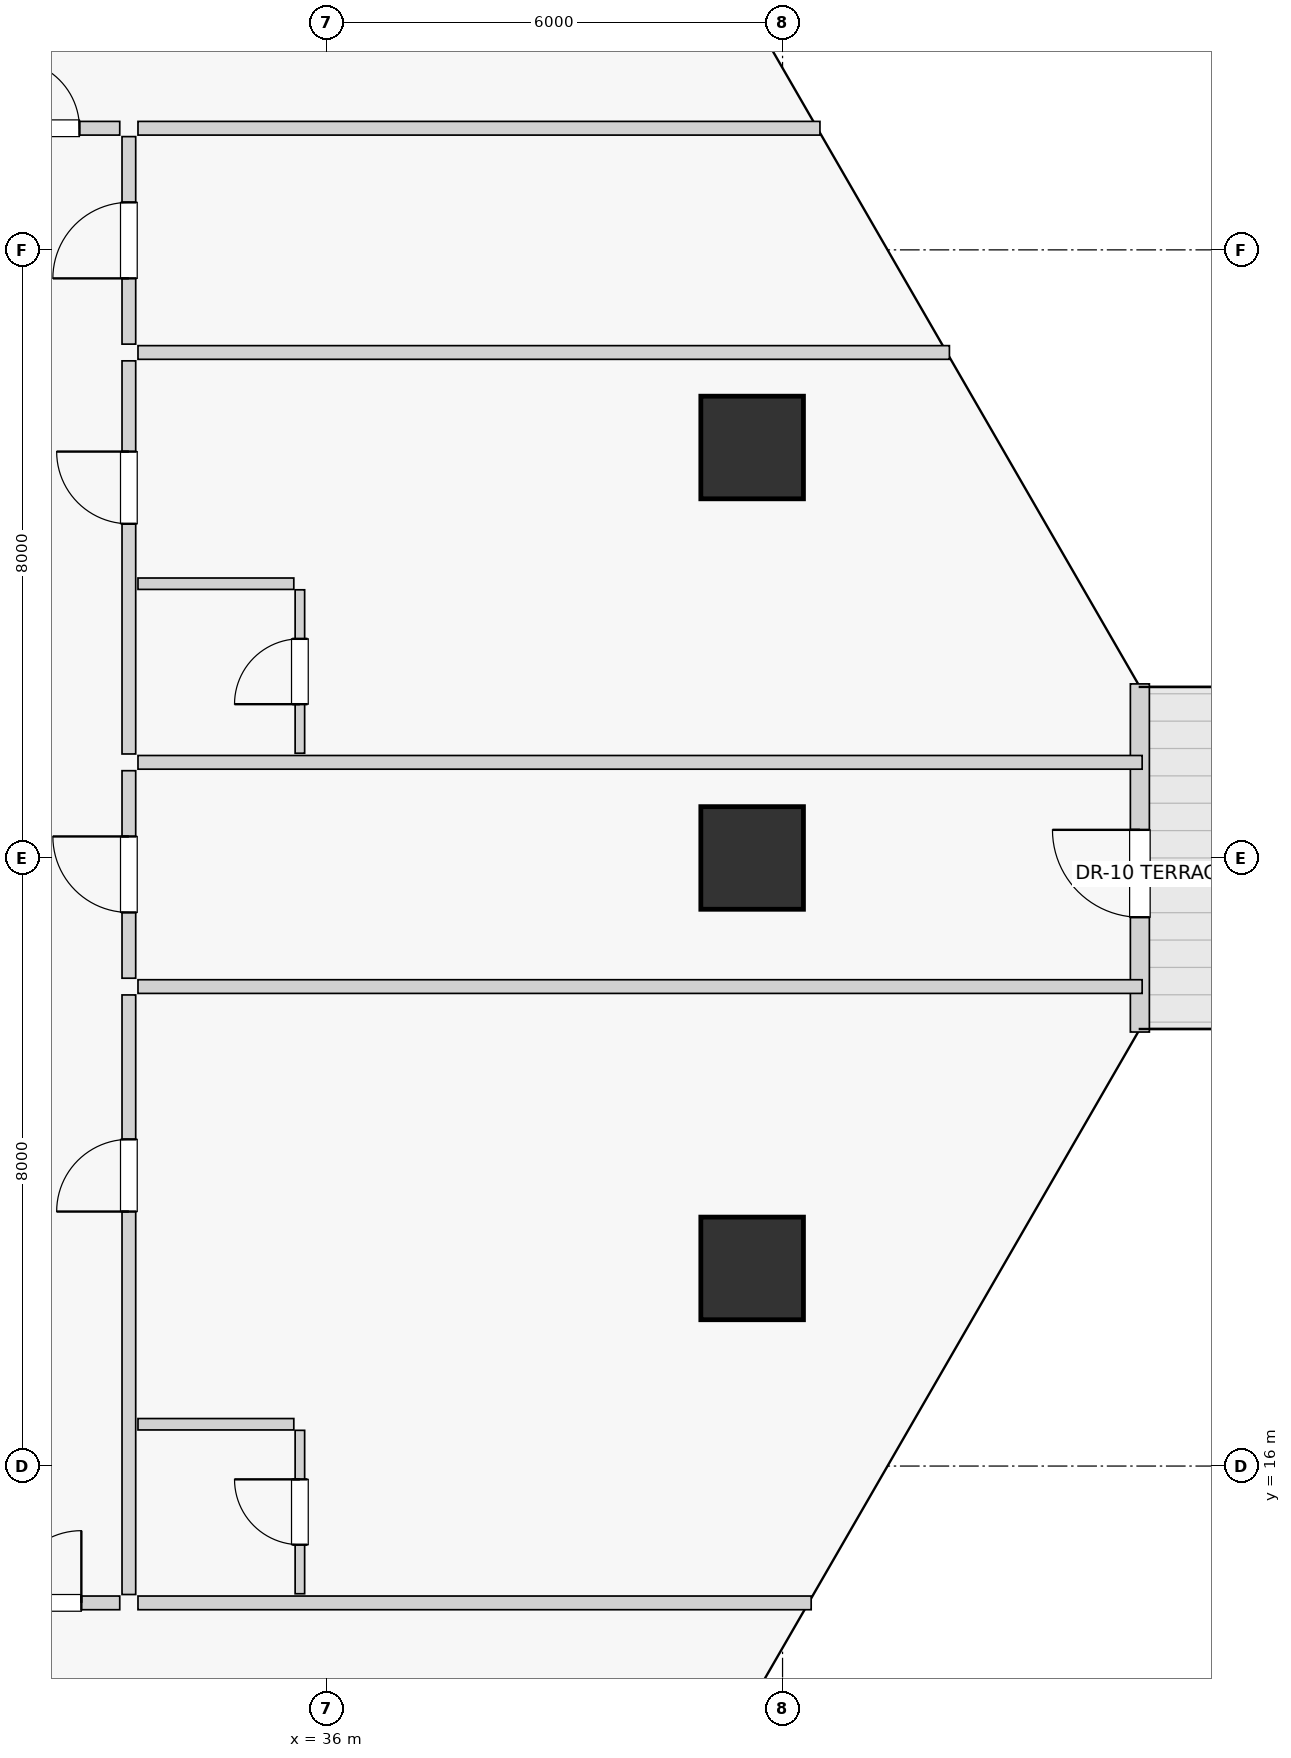
"""IFC4 building model, lengths in metres.
Left out: names, types, materials, properties, quantities, classifications, styles, units other than length and angle.
Written with IfcOpenShell. Run it as: python <this file> out.ifc"""

import sys

from ifc_helpers import new_model, si_unit, direction, frame, frame_2d, origin, origin_2d, place, context, subcontext, project, spatial, rectangle, extrude, source, transform, mapped, element, fill, save


model = new_model("IFC4")
c1 = context("Model", 3, precision=1e-05, world=origin(), true_north=direction((0.0, 1.0)))
c2 = subcontext(c1, "Body", "Model", "MODEL_VIEW")
j1 = project(units=[si_unit("LENGTHUNIT", "METRE"), si_unit("PLANEANGLEUNIT", "RADIAN")], contexts=[c1])
p1 = place(None, origin())
s1 = spatial("IfcSite", under=j1, at=p1, CompositionType="ELEMENT")
p2 = place(p1, origin())
s2 = spatial("IfcBuilding", under=s1, at=p2, CompositionType="ELEMENT")
p3 = place(p2, frame((0.0, 0.0, 22.8)))
s3 = spatial("IfcBuildingStorey", under=s2, at=p3, CompositionType="ELEMENT", Elevation=22.8)
p4 = place(p3, frame((41.6, 18.6, 0.0), z_axis=(0.0, 0.0, 1.0), x_axis=(1.0, 0.0, 0.0)))
e1 = element("IfcColumn", 1, at=p4, inside=s3, PredefinedType="COLUMN", context=c2, shape_type="SweptSolid", body=[
    extrude(rectangle(XDim=1.35, YDim=1.35, at=origin_2d()), origin(), (0.0, 0.0, 1.0), 4.5),
])
p5 = place(p3, frame((41.6, 24.0, -0.35), z_axis=(0.0, 0.0, 1.0), x_axis=(1.0, 0.0, 0.0)))
e2 = element("IfcColumn", 2, at=p5, inside=s3, PredefinedType="COLUMN", context=c2, shape_type="SweptSolid", body=[
    extrude(rectangle(XDim=1.35, YDim=1.35, at=origin_2d()), origin(), (0.0, 0.0, 1.0), 4.85),
])
p6 = place(p3, frame((41.6, 29.4, 0.0), z_axis=(0.0, 0.0, 1.0), x_axis=(1.0, 0.0, 0.0)))
e3 = element("IfcColumn", 3, at=p6, inside=s3, PredefinedType="COLUMN", context=c2, shape_type="SweptSolid", body=[
    extrude(rectangle(XDim=1.35, YDim=1.35, at=origin_2d()), origin(), (0.0, 0.0, 1.0), 4.5),
])
p7 = place(p3, frame((46.701, 21.71, 0.0), z_axis=(0.0, 0.0, 1.0), x_axis=(0.0, 1.0, 0.0)))
e4 = element("IfcWall", 4, at=p7, inside=s3, PredefinedType="SOLIDWALL", context=c2, shape_type="SweptSolid", body=[
    extrude(rectangle(XDim=4.58, YDim=0.25, at=frame_2d((2.29, 0.0))), origin(), (0.0, 0.0, 1.0), 4.25),
])
p8 = place(p7, frame((1.51, 0.0, 0.0)))
e5 = element("IfcOpeningElement", 5, at=p8, cuts=e4, PredefinedType="OPENING", context=c2, shape_type="SweptSolid", body=[
    extrude(rectangle(XDim=1.15, YDim=2.25, at=frame_2d((0.575, 1.125))), frame((0.0, 0.135, 0.0), z_axis=(0.0, -1.0, 0.0), x_axis=(1.0, 0.0, 0.0)), (0.0, 0.0, 1.0), 0.27),
])
p9 = place(p3, frame((33.52, 14.2, 0.0), z_axis=(0.0, 0.0, 1.0), x_axis=(1.0, 0.0, 0.0)))
e6 = element("IfcWall", 6, at=p9, inside=s3, PredefinedType="PARTITIONING", context=c2, shape_type="SweptSolid", body=[
    extrude(rectangle(XDim=8.857, YDim=0.18, at=frame_2d((4.428, 0.0))), origin(), (0.0, 0.0, 1.0), 4.25),
])
p10 = place(p3, frame((33.52, 33.6, 0.0), z_axis=(0.0, 0.0, 1.0), x_axis=(1.0, 0.0, 0.0)))
e7 = element("IfcWall", 7, at=p10, inside=s3, PredefinedType="PARTITIONING", context=c2, shape_type="SweptSolid", body=[
    extrude(rectangle(XDim=8.972, YDim=0.18, at=frame_2d((4.486, 0.0))), origin(), (0.0, 0.0, 1.0), 4.25),
])
p11 = place(p3, frame((33.4, 22.418, 0.0), z_axis=(0.0, 0.0, 1.0), x_axis=(0.0, 1.0, 0.0)))
e8 = element("IfcWall", 8, at=p11, inside=s3, PredefinedType="PARTITIONING", context=c2, shape_type="SweptSolid", body=[
    extrude(rectangle(XDim=2.73, YDim=0.18, at=frame_2d((1.365, 0.0))), origin(), (0.0, 0.0, 1.0), 4.25),
])
p12 = place(p11, frame((0.865, 0.0, 0.0)))
e9 = element("IfcOpeningElement", 9, at=p12, cuts=e8, PredefinedType="OPENING", context=c2, shape_type="SweptSolid", body=[
    extrude(rectangle(XDim=1.0, YDim=2.01, at=frame_2d((0.5, 1.005))), frame((0.0, 0.1, 0.0), z_axis=(0.0, -1.0, 0.0), x_axis=(1.0, 0.0, 0.0)), (0.0, 0.0, 1.0), 0.2),
])
p13 = place(p3, frame((33.52, 22.308, 0.0), z_axis=(0.0, 0.0, 1.0), x_axis=(1.0, 0.0, 0.0)))
e10 = element("IfcWall", 10, at=p13, inside=s3, PredefinedType="PARTITIONING", context=c2, shape_type="SweptSolid", body=[
    extrude(rectangle(XDim=13.211, YDim=0.18, at=frame_2d((6.605, 0.0))), origin(), (0.0, 0.0, 1.0), 4.25),
])
p14 = place(p3, frame((33.4, 14.31, 0.0), z_axis=(0.0, 0.0, 1.0), x_axis=(0.0, 1.0, 0.0)))
e11 = element("IfcWall", 11, at=p14, inside=s3, PredefinedType="PARTITIONING", context=c2, shape_type="SweptSolid", body=[
    extrude(rectangle(XDim=7.888, YDim=0.18, at=frame_2d((3.944, 0.0))), origin(), (0.0, 0.0, 1.0), 4.25),
])
p15 = place(p14, frame((5.038, 0.0, 0.0)))
e12 = element("IfcOpeningElement", 12, at=p15, cuts=e11, PredefinedType="OPENING", context=c2, shape_type="SweptSolid", body=[
    extrude(rectangle(XDim=0.95, YDim=2.02, at=frame_2d((0.475, 1.01))), frame((0.0, 0.1, 0.0), z_axis=(0.0, -1.0, 0.0), x_axis=(1.0, 0.0, 0.0)), (0.0, 0.0, 1.0), 0.2),
])
p16 = place(p3, frame((33.52, 16.55, 0.0), z_axis=(0.0, 0.0, 1.0), x_axis=(1.0, 0.0, 0.0)))
e13 = element("IfcWall", 13, at=p16, inside=s3, PredefinedType="PARTITIONING", context=c2, shape_type="SweptSolid", body=[
    extrude(rectangle(XDim=2.05, YDim=0.15, at=frame_2d((1.025, 0.0))), origin(), (0.0, 0.0, 1.0), 4.25),
])
p17 = place(p3, frame((35.65, 14.32, 0.0), z_axis=(0.0, 0.0, 1.0), x_axis=(0.0, 1.0, 0.0)))
e14 = element("IfcWall", 14, at=p17, inside=s3, PredefinedType="PARTITIONING", context=c2, shape_type="SweptSolid", body=[
    extrude(rectangle(XDim=2.15, YDim=0.125, at=frame_2d((1.075, 0.0))), origin(), (0.0, 0.0, 1.0), 4.25),
])
p18 = place(p17, frame((0.645, 0.0, 0.0)))
e15 = element("IfcOpeningElement", 15, at=p18, cuts=e14, PredefinedType="OPENING", context=c2, shape_type="SweptSolid", body=[
    extrude(rectangle(XDim=0.86, YDim=2.01, at=frame_2d((0.43, 1.005))), frame((0.0, 0.073, 0.0), z_axis=(0.0, -1.0, 0.0), x_axis=(1.0, 0.0, 0.0)), (0.0, 0.0, 1.0), 0.145),
])
p19 = place(p3, frame((33.52, 25.258, 0.0), z_axis=(0.0, 0.0, 1.0), x_axis=(1.0, 0.0, 0.0)))
e16 = element("IfcWall", 16, at=p19, inside=s3, PredefinedType="PARTITIONING", context=c2, shape_type="SweptSolid", body=[
    extrude(rectangle(XDim=13.211, YDim=0.18, at=frame_2d((6.605, 0.0))), origin(), (0.0, 0.0, 1.0), 4.25),
])
p20 = place(p3, frame((33.4, 30.76, 0.0), z_axis=(0.0, 0.0, 1.0), x_axis=(0.0, 1.0, 0.0)))
e17 = element("IfcWall", 17, at=p20, inside=s3, PredefinedType="PARTITIONING", context=c2, shape_type="SweptSolid", body=[
    extrude(rectangle(XDim=2.73, YDim=0.18, at=frame_2d((1.365, 0.0))), origin(), (0.0, 0.0, 1.0), 4.25),
])
p21 = place(p20, frame((0.865, 0.0, 0.0)))
e18 = element("IfcOpeningElement", 18, at=p21, cuts=e17, PredefinedType="OPENING", context=c2, shape_type="SweptSolid", body=[
    extrude(rectangle(XDim=1.0, YDim=2.01, at=frame_2d((0.5, 1.005))), frame((0.0, 0.1, 0.0), z_axis=(0.0, -1.0, 0.0), x_axis=(1.0, 0.0, 0.0)), (0.0, 0.0, 1.0), 0.2),
])
p22 = place(p3, frame((33.52, 30.65, 0.0), z_axis=(0.0, 0.0, 1.0), x_axis=(1.0, 0.0, 0.0)))
e19 = element("IfcWall", 19, at=p22, inside=s3, PredefinedType="PARTITIONING", context=c2, shape_type="SweptSolid", body=[
    extrude(rectangle(XDim=10.675, YDim=0.18, at=frame_2d((5.338, 0.0))), origin(), (0.0, 0.0, 1.0), 3.549),
])
p23 = place(p3, frame((33.4, 25.368, 0.0), z_axis=(0.0, 0.0, 1.0), x_axis=(0.0, 1.0, 0.0)))
e20 = element("IfcWall", 20, at=p23, inside=s3, PredefinedType="PARTITIONING", context=c2, shape_type="SweptSolid", body=[
    extrude(rectangle(XDim=5.172, YDim=0.18, at=frame_2d((2.586, 0.0))), origin(), (0.0, 0.0, 1.0), 4.25),
])
p24 = place(p23, frame((3.028, 0.0, 0.0)))
e21 = element("IfcOpeningElement", 21, at=p24, cuts=e20, PredefinedType="OPENING", context=c2, shape_type="SweptSolid", body=[
    extrude(rectangle(XDim=0.95, YDim=2.02, at=frame_2d((0.475, 1.01))), frame((0.0, 0.1, 0.0), z_axis=(0.0, -1.0, 0.0), x_axis=(1.0, 0.0, 0.0)), (0.0, 0.0, 1.0), 0.2),
])
p25 = place(p3, frame((33.52, 27.608, 0.0), z_axis=(0.0, 0.0, 1.0), x_axis=(1.0, 0.0, 0.0)))
e22 = element("IfcWall", 22, at=p25, inside=s3, PredefinedType="PARTITIONING", context=c2, shape_type="SweptSolid", body=[
    extrude(rectangle(XDim=2.05, YDim=0.15, at=frame_2d((1.025, 0.0))), origin(), (0.0, 0.0, 1.0), 4.25),
])
p26 = place(p3, frame((35.65, 25.378, 0.0), z_axis=(0.0, 0.0, 1.0), x_axis=(0.0, 1.0, 0.0)))
e23 = element("IfcWall", 23, at=p26, inside=s3, PredefinedType="PARTITIONING", context=c2, shape_type="SweptSolid", body=[
    extrude(rectangle(XDim=2.15, YDim=0.125, at=frame_2d((1.075, 0.0))), origin(), (0.0, 0.0, 1.0), 4.25),
])
p27 = place(p26, frame((0.645, 0.0, 0.0)))
e24 = element("IfcOpeningElement", 24, at=p27, cuts=e23, PredefinedType="OPENING", context=c2, shape_type="SweptSolid", body=[
    extrude(rectangle(XDim=0.86, YDim=2.01, at=frame_2d((0.43, 1.005))), frame((0.0, 0.073, 0.0), z_axis=(0.0, -1.0, 0.0), x_axis=(1.0, 0.0, 0.0)), (0.0, 0.0, 1.0), 0.145),
])
p28 = place(p3, frame((31.32, 14.2, 0.0), z_axis=(0.0, 0.0, 1.0), x_axis=(1.0, 0.0, 0.0)))
e25 = element("IfcWall", 25, at=p28, inside=s3, PredefinedType="PARTITIONING", context=c2, shape_type="SweptSolid", body=[
    extrude(rectangle(XDim=1.96, YDim=0.18, at=frame_2d((0.98, 0.0))), origin(), (0.0, 0.0, 1.0), 4.25),
])
p29 = place(p28, frame((0.505, 0.0, 0.0)))
e26 = element("IfcOpeningElement", 26, at=p29, cuts=e25, PredefinedType="OPENING", context=c2, shape_type="SweptSolid", body=[
    extrude(rectangle(XDim=0.95, YDim=2.02, at=frame_2d((0.475, 1.01))), frame((0.0, 0.1, 0.0), z_axis=(0.0, -1.0, 0.0), x_axis=(1.0, 0.0, 0.0)), (0.0, 0.0, 1.0), 0.2),
])
p30 = place(p3, frame((31.32, 33.6, 0.0), z_axis=(0.0, 0.0, 1.0), x_axis=(1.0, 0.0, 0.0)))
e27 = element("IfcWall", 27, at=p30, inside=s3, PredefinedType="PARTITIONING", context=c2, shape_type="SweptSolid", body=[
    extrude(rectangle(XDim=1.96, YDim=0.18, at=frame_2d((0.98, 0.0))), origin(), (0.0, 0.0, 1.0), 4.25),
])
p31 = place(p30, frame((0.53, 0.0, 0.0)))
e28 = element("IfcOpeningElement", 28, at=p31, cuts=e27, PredefinedType="OPENING", context=c2, shape_type="SweptSolid", body=[
    extrude(rectangle(XDim=0.9, YDim=2.01, at=frame_2d((0.45, 1.005))), frame((0.0, 0.1, 0.0), z_axis=(0.0, -1.0, 0.0), x_axis=(1.0, 0.0, 0.0)), (0.0, 0.0, 1.0), 0.2),
])
m1 = source(origin(), c2, "Body", "SweptSolid", [
    extrude(rectangle(XDim=1.15, YDim=2.25, at=frame_2d((0.575, 1.125))), frame((0.0, 0.025, 0.0), z_axis=(0.0, -1.0, 0.0), x_axis=(1.0, 0.0, 0.0)), (0.0, 0.0, 1.0), 0.05),
])
p32 = place(p8, frame((1.15, 0.0, 0.0), z_axis=(0.0, 0.0, 1.0), x_axis=(-1.0, 0.0, 0.0)))
e29 = element("IfcDoor", 29, at=p32, inside=s3, OperationType="SINGLE_SWING_RIGHT", PredefinedType="DOOR", context=c2, shape_type="MappedRepresentation", body=[
    mapped(m1, transform((0.0, 0.0, 0.0), scale=1.0)),
])
fill(e5, e29)
m2 = source(origin(), c2, "Body", "SweptSolid", [
    extrude(rectangle(XDim=1.0, YDim=2.01, at=frame_2d((0.5, 1.005))), frame((0.0, 0.025, 0.0), z_axis=(0.0, -1.0, 0.0), x_axis=(1.0, 0.0, 0.0)), (0.0, 0.0, 1.0), 0.05),
])
p33 = place(p12, origin())
e30 = element("IfcDoor", 30, at=p33, inside=s3, OperationType="SINGLE_SWING_RIGHT", PredefinedType="DOOR", context=c2, shape_type="MappedRepresentation", body=[
    mapped(m2, transform((0.0, 0.0, 0.0), scale=1.0)),
])
fill(e9, e30)
m3 = source(origin(), c2, "Body", "SweptSolid", [
    extrude(rectangle(XDim=0.95, YDim=2.02, at=frame_2d((0.475, 1.01))), frame((0.0, 0.025, 0.0), z_axis=(0.0, -1.0, 0.0), x_axis=(1.0, 0.0, 0.0)), (0.0, 0.0, 1.0), 0.05),
])
p34 = place(p15, origin())
e31 = element("IfcDoor", 31, at=p34, inside=s3, OperationType="SINGLE_SWING_LEFT", PredefinedType="DOOR", context=c2, shape_type="MappedRepresentation", body=[
    mapped(m3, transform((0.0, 0.0, 0.0), scale=1.0)),
])
fill(e12, e31)
m4 = source(origin(), c2, "Body", "SweptSolid", [
    extrude(rectangle(XDim=0.86, YDim=2.01, at=frame_2d((0.43, 1.005))), frame((0.0, 0.025, 0.0), z_axis=(0.0, -1.0, 0.0), x_axis=(1.0, 0.0, 0.0)), (0.0, 0.0, 1.0), 0.05),
])
p35 = place(p18, origin())
e32 = element("IfcDoor", 32, at=p35, inside=s3, OperationType="SINGLE_SWING_RIGHT", PredefinedType="DOOR", context=c2, shape_type="MappedRepresentation", body=[
    mapped(m4, transform((0.0, 0.0, 0.0), scale=1.0)),
])
fill(e15, e32)
p36 = place(p21, origin())
e33 = element("IfcDoor", 33, at=p36, inside=s3, OperationType="SINGLE_SWING_LEFT", PredefinedType="DOOR", context=c2, shape_type="MappedRepresentation", body=[
    mapped(m2, transform((0.0, 0.0, 0.0), scale=1.0)),
])
fill(e18, e33)
p37 = place(p24, origin())
e34 = element("IfcDoor", 34, at=p37, inside=s3, OperationType="SINGLE_SWING_RIGHT", PredefinedType="DOOR", context=c2, shape_type="MappedRepresentation", body=[
    mapped(m3, transform((0.0, 0.0, 0.0), scale=1.0)),
])
fill(e21, e34)
p38 = place(p27, origin())
e35 = element("IfcDoor", 35, at=p38, inside=s3, OperationType="SINGLE_SWING_LEFT", PredefinedType="DOOR", context=c2, shape_type="MappedRepresentation", body=[
    mapped(m4, transform((0.0, 0.0, 0.0), scale=1.0)),
])
fill(e24, e35)
p39 = place(p29, origin())
e36 = element("IfcDoor", 36, at=p39, inside=s3, OperationType="SINGLE_SWING_RIGHT", PredefinedType="DOOR", context=c2, shape_type="MappedRepresentation", body=[
    mapped(m3, transform((0.0, 0.0, 0.0), scale=1.0)),
])
fill(e26, e36)
m5 = source(origin(), c2, "Body", "SweptSolid", [
    extrude(rectangle(XDim=0.9, YDim=2.01, at=frame_2d((0.45, 1.005))), frame((0.0, 0.025, 0.0), z_axis=(0.0, -1.0, 0.0), x_axis=(1.0, 0.0, 0.0)), (0.0, 0.0, 1.0), 0.05),
])
p40 = place(p31, origin())
e37 = element("IfcDoor", 37, at=p40, inside=s3, OperationType="SINGLE_SWING_LEFT", PredefinedType="DOOR", context=c2, shape_type="MappedRepresentation", body=[
    mapped(m5, transform((0.0, 0.0, 0.0), scale=1.0)),
])
fill(e28, e37)
save(model, sys.argv[1])
